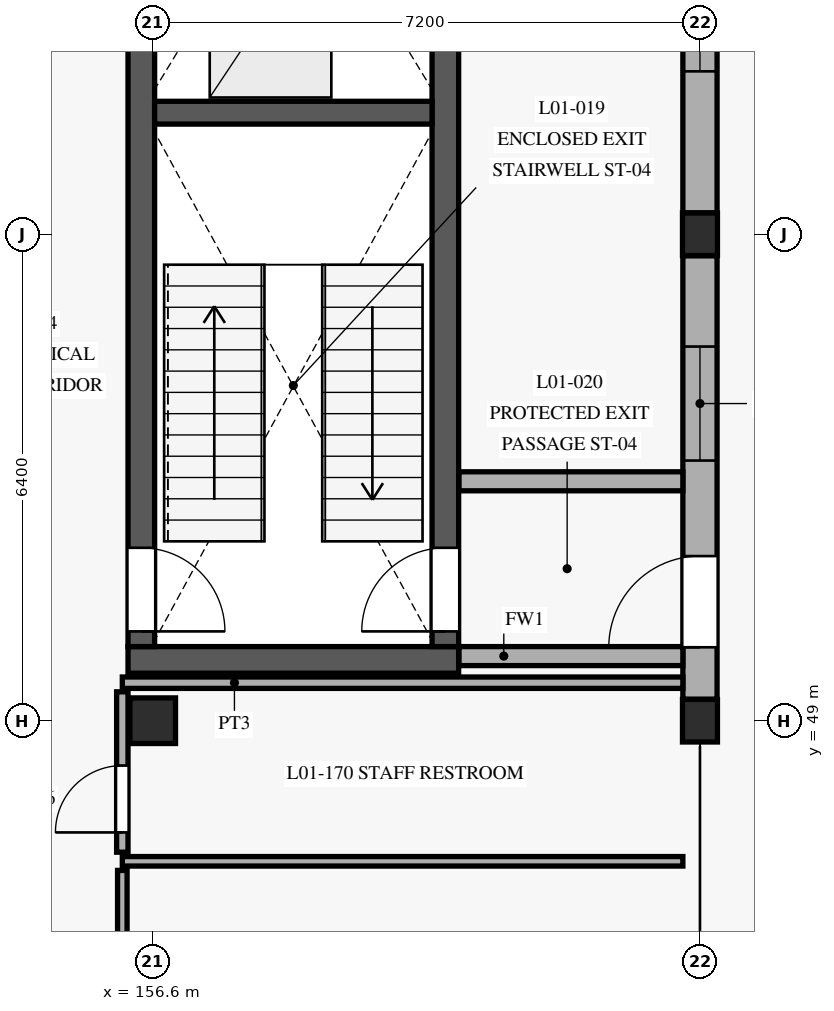
"""IFC4 building model, lengths in metres.
Left out: names, types, materials, properties, quantities, classifications, styles, units other than length and angle.
Written with IfcOpenShell. Run it as: python <this file> out.ifc"""

import sys

from ifc_helpers import new_model, si_unit, direction, frame, frame_2d, origin, origin_with_axes, origin_2d, place, context, subcontext, project, spatial, rectangle, extrude, element, fill, save


model = new_model("IFC4")
c1 = context("Model", 3, precision=1e-05, world=origin(), true_north=direction((0.0, 1.0)))
c2 = subcontext(c1, "Body", "Model", "MODEL_VIEW")
j1 = project(units=[si_unit("LENGTHUNIT", "METRE"), si_unit("PLANEANGLEUNIT", "RADIAN")], contexts=[c1])
p1 = place(None, origin())
s1 = spatial("IfcSite", under=j1, at=p1, CompositionType="ELEMENT")
p2 = place(p1, origin())
s2 = spatial("IfcBuilding", under=s1, at=p2, CompositionType="ELEMENT")
p3 = place(p2, origin())
s3 = spatial("IfcBuildingStorey", under=s2, at=p3, CompositionType="ELEMENT", Elevation=0.0)
p4 = place(p3, frame((156.6, 49.0, 0.0), z_axis=(0.0, 0.0, 1.0), x_axis=(1.0, 0.0, 0.0)))
e1 = element("IfcColumn", 1, at=p4, inside=s3, PredefinedType="COLUMN", context=c2, shape_type="SweptSolid", body=[
    extrude(rectangle(XDim=0.6, YDim=0.6, at=origin_2d()), origin(), (0.0, 0.0, 1.0), 4.8),
])
for number, where, z_axis, x_axis in (
    (2, (163.8, 49.0, 0.0), (0.0, 0.0, 1.0), (1.0, 0.0, 0.0)),
    (3, (163.8, 55.4, 0.0), (0.0, 0.0, 1.0), (1.0, 0.0, 0.0)),
):
    element("IfcColumn", number, at=place(p3, frame(where, z_axis=z_axis, x_axis=x_axis)), inside=s3, PredefinedType="COLUMN", context=c2, shape_type="SweptSolid", body=[
        extrude(rectangle(XDim=0.46, YDim=0.56, at=origin_2d()), origin(), (0.0, 0.0, 1.0), 4.8),
    ])
p5 = place(p3, frame((156.275, 49.8, 0.0), z_axis=(0.0, 0.0, 1.0), x_axis=(1.0, 0.0, 0.0)))
e4 = element("IfcWall", 4, at=p5, inside=s3, PredefinedType="SHEAR", context=c2, shape_type="SweptSolid", body=[
    extrude(rectangle(XDim=4.35, YDim=0.35, at=frame_2d((2.175, 0.0))), origin(), (0.0, 0.0, 1.0), 4.5),
])
p6 = place(p3, frame((156.45, 63.425, 0.0), z_axis=(0.0, 0.0, 1.0), x_axis=(0.0, -1.0, 0.0)))
e5 = element("IfcWall", 5, at=p6, inside=s3, PredefinedType="SHEAR", context=c2, shape_type="SweptSolid", body=[
    extrude(rectangle(XDim=13.45, YDim=0.35, at=frame_2d((6.725, 0.0))), origin(), (0.0, 0.0, 1.0), 4.5),
])
p7 = place(p6, frame((12.15, 0.0, 0.0)))
e6 = element("IfcOpeningElement", 6, at=p7, cuts=e5, PredefinedType="OPENING", context=c2, shape_type="SweptSolid", body=[
    extrude(rectangle(XDim=1.1, YDim=2.2, at=frame_2d((0.55, 1.1))), frame((0.0, 0.185, 0.0), z_axis=(0.0, -1.0, 0.0), x_axis=(1.0, 0.0, 0.0)), (0.0, 0.0, 1.0), 0.37),
])
p8 = place(p6, frame((4.45, 0.0, 0.0)))
e7 = element("IfcOpeningElement", 7, at=p8, cuts=e5, PredefinedType="OPENING", context=c2, shape_type="SweptSolid", body=[
    extrude(rectangle(XDim=1.15, YDim=2.2, at=frame_2d((0.575, 1.1))), frame((0.0, 0.185, 0.0), z_axis=(0.0, -1.0, 0.0), x_axis=(1.0, 0.0, 0.0)), (0.0, 0.0, 1.0), 0.37),
])
p9 = place(p6, frame((2.315, 0.0, 0.0)))
e8 = element("IfcOpeningElement", 8, at=p9, cuts=e5, PredefinedType="OPENING", context=c2, shape_type="SweptSolid", body=[
    extrude(rectangle(XDim=1.02, YDim=2.15, at=frame_2d((0.51, 1.075))), frame((0.0, 0.185, 0.0), z_axis=(0.0, -1.0, 0.0), x_axis=(1.0, 0.0, 0.0)), (0.0, 0.0, 1.0), 0.37),
])
p10 = place(p6, frame((0.415, 0.0, 0.0)))
e9 = element("IfcOpeningElement", 9, at=p10, cuts=e5, PredefinedType="OPENING", context=c2, shape_type="SweptSolid", body=[
    extrude(rectangle(XDim=1.02, YDim=2.15, at=frame_2d((0.51, 1.075))), frame((0.0, 0.185, 0.0), z_axis=(0.0, -1.0, 0.0), x_axis=(1.0, 0.0, 0.0)), (0.0, 0.0, 1.0), 0.37),
])
p11 = place(p3, frame((160.45, 49.975, 0.0), z_axis=(0.0, 0.0, 1.0), x_axis=(0.0, 1.0, 0.0)))
e10 = element("IfcWall", 10, at=p11, inside=s3, PredefinedType="SHEAR", context=c2, shape_type="SweptSolid", body=[
    extrude(rectangle(XDim=13.45, YDim=0.35, at=frame_2d((6.725, 0.0))), origin(), (0.0, 0.0, 1.0), 4.5),
])
p12 = place(p11, frame((0.2, 0.0, 0.0)))
e11 = element("IfcOpeningElement", 11, at=p12, cuts=e10, PredefinedType="OPENING", context=c2, shape_type="SweptSolid", body=[
    extrude(rectangle(XDim=1.1, YDim=2.2, at=frame_2d((0.55, 1.1))), frame((0.0, 0.185, 0.0), z_axis=(0.0, -1.0, 0.0), x_axis=(1.0, 0.0, 0.0)), (0.0, 0.0, 1.0), 0.37),
])
p13 = place(p3, frame((156.625, 57.0, 0.0), z_axis=(0.0, 0.0, 1.0), x_axis=(1.0, 0.0, 0.0)))
e12 = element("IfcWall", 12, at=p13, inside=s3, PredefinedType="SHEAR", context=c2, shape_type="SweptSolid", body=[
    extrude(rectangle(XDim=3.65, YDim=0.3, at=frame_2d((1.825, 0.0))), origin(), (0.0, 0.0, 1.0), 4.5),
])
p14 = place(p3, frame((163.8, 49.282, 0.0), z_axis=(0.0, 0.0, 1.0), x_axis=(0.0, 1.0, 0.0)))
e13 = element("IfcWall", 13, at=p14, inside=s3, PredefinedType="SOLIDWALL", context=c2, shape_type="SweptSolid", body=[
    extrude(rectangle(XDim=5.836, YDim=0.45, at=frame_2d((2.918, 0.0))), origin(), (0.0, 0.0, 1.0), 3.95),
])
p15 = place(p14, frame((0.684, 0.0, 0.0)))
e14 = element("IfcOpeningElement", 14, at=p15, cuts=e13, PredefinedType="OPENING", context=c2, shape_type="SweptSolid", body=[
    extrude(rectangle(XDim=1.2, YDim=2.25, at=frame_2d((0.6, 1.125))), frame((0.0, 0.235, 0.0), z_axis=(0.0, -1.0, 0.0), x_axis=(1.0, 0.0, 0.0)), (0.0, 0.0, 1.0), 0.47),
])
p16 = place(p14, frame((3.141, 0.0, 0.65)))
e15 = element("IfcOpeningElement", 15, at=p16, cuts=e13, PredefinedType="OPENING", context=c2, shape_type="SweptSolid", body=[
    extrude(rectangle(XDim=1.5, YDim=2.2, at=frame_2d((0.75, 1.1))), frame((0.0, 0.235, 0.0), z_axis=(0.0, -1.0, 0.0), x_axis=(1.0, 0.0, 0.0)), (0.0, 0.0, 1.0), 0.47),
])
p17 = place(p3, frame((163.8, 55.682, 0.0), z_axis=(0.0, 0.0, 1.0), x_axis=(0.0, 1.0, 0.0)))
e16 = element("IfcWall", 16, at=p17, inside=s3, PredefinedType="SOLIDWALL", context=c2, shape_type="SweptSolid", body=[
    extrude(rectangle(XDim=7.836, YDim=0.45, at=frame_2d((3.918, 0.0))), origin(), (0.0, 0.0, 1.0), 3.95),
])
p18 = place(p17, frame((1.862, 0.0, 0.65)))
e17 = element("IfcOpeningElement", 17, at=p18, cuts=e16, PredefinedType="OPENING", context=c2, shape_type="SweptSolid", body=[
    extrude(rectangle(XDim=1.5, YDim=2.2, at=frame_2d((0.75, 1.1))), frame((0.0, 0.235, 0.0), z_axis=(0.0, -1.0, 0.0), x_axis=(1.0, 0.0, 0.0)), (0.0, 0.0, 1.0), 0.47),
])
p19 = place(p17, frame((4.474, 0.0, 0.65)))
e18 = element("IfcOpeningElement", 18, at=p19, cuts=e16, PredefinedType="OPENING", context=c2, shape_type="SweptSolid", body=[
    extrude(rectangle(XDim=1.5, YDim=2.2, at=frame_2d((0.75, 1.1))), frame((0.0, 0.235, 0.0), z_axis=(0.0, -1.0, 0.0), x_axis=(1.0, 0.0, 0.0)), (0.0, 0.0, 1.0), 0.47),
])
for number, where, z_axis, x_axis in (
    (19, (160.63, 49.85, 0.0), (0.0, 0.0, 1.0), (1.0, 0.0, 0.0)),
    (20, (160.63, 52.15, 0.0), (0.0, 0.0, 1.0), (1.0, 0.0, 0.0)),
):
    element("IfcWall", number, at=place(p3, frame(where, z_axis=z_axis, x_axis=x_axis)), inside=s3, PredefinedType="SOLIDWALL", context=c2, shape_type="SweptSolid", body=[
        extrude(rectangle(XDim=2.945, YDim=0.25, at=frame_2d((1.473, 0.0))), origin(), (0.0, 0.0, 1.0), 3.945),
    ])
p20 = place(p3, frame((156.2, 38.0, 0.0), z_axis=(0.0, 0.0, 1.0), x_axis=(0.0, 1.0, 0.0)))
e21 = element("IfcWall", 21, at=p20, inside=s3, PredefinedType="PARTITIONING", context=c2, shape_type="SweptSolid", body=[
    extrude(rectangle(XDim=9.03, YDim=0.125, at=frame_2d((4.515, 0.0))), origin(), (0.0, 0.0, 1.0), 4.495),
])
p21 = place(p20, frame((2.847, 0.0, 0.0)))
e22 = element("IfcOpeningElement", 22, at=p21, cuts=e21, PredefinedType="OPENING", context=c2, shape_type="SweptSolid", body=[
    extrude(rectangle(XDim=0.9, YDim=2.12, at=frame_2d((0.45, 1.06))), frame((0.0, 0.073, 0.0), z_axis=(0.0, -1.0, 0.0), x_axis=(1.0, 0.0, 0.0)), (0.0, 0.0, 1.0), 0.145),
])
p22 = place(p3, frame((156.2, 47.15, 0.0), z_axis=(0.0, 0.0, 1.0), x_axis=(1.0, 0.0, 0.0)))
e23 = element("IfcWall", 23, at=p22, inside=s3, PredefinedType="PARTITIONING", context=c2, shape_type="SweptSolid", body=[
    extrude(rectangle(XDim=7.375, YDim=0.125, at=frame_2d((3.688, 0.0))), origin(), (0.0, 0.0, 1.0), 3.945),
])
p23 = place(p3, frame((156.2, 47.27, 0.0), z_axis=(0.0, 0.0, 1.0), x_axis=(0.0, 1.0, 0.0)))
e24 = element("IfcWall", 24, at=p23, inside=s3, PredefinedType="PARTITIONING", context=c2, shape_type="SweptSolid", body=[
    extrude(rectangle(XDim=2.11, YDim=0.15, at=frame_2d((1.055, 0.0))), origin(), (0.0, 0.0, 1.0), 3.845),
])
p24 = place(p23, frame((0.26, 0.0, 0.0)))
e25 = element("IfcOpeningElement", 25, at=p24, cuts=e24, PredefinedType="OPENING", context=c2, shape_type="SweptSolid", body=[
    extrude(rectangle(XDim=0.88, YDim=2.1, at=frame_2d((0.44, 1.05))), frame((0.0, 0.085, 0.0), z_axis=(0.0, -1.0, 0.0), x_axis=(1.0, 0.0, 0.0)), (0.0, 0.0, 1.0), 0.17),
])
p25 = place(p3, frame((156.2, 49.5, 0.0), z_axis=(0.0, 0.0, 1.0), x_axis=(1.0, 0.0, 0.0)))
e26 = element("IfcWall", 26, at=p25, inside=s3, PredefinedType="PARTITIONING", context=c2, shape_type="SweptSolid", body=[
    extrude(rectangle(XDim=7.375, YDim=0.15, at=frame_2d((3.688, 0.0))), origin(), (0.0, 0.0, 1.0), 3.945),
])
p26 = place(p7, origin_with_axes())
e27 = element("IfcDoor", 27, at=p26, inside=s3, OperationType="SINGLE_SWING_RIGHT", PredefinedType="DOOR", context=c2, shape_type="SweptSolid", body=[
    extrude(rectangle(XDim=1.1, YDim=2.2, at=frame_2d((0.55, 1.1))), frame((0.0, 0.025, 0.0), z_axis=(0.0, -1.0, 0.0), x_axis=(1.0, 0.0, 0.0)), (0.0, 0.0, 1.0), 0.05),
])
fill(e6, e27)
p27 = place(p12, frame((1.1, 0.0, 0.0), z_axis=(0.0, 0.0, 1.0), x_axis=(-1.0, 0.0, 0.0)))
e28 = element("IfcDoor", 28, at=p27, inside=s3, OperationType="SINGLE_SWING_RIGHT", PredefinedType="DOOR", context=c2, shape_type="SweptSolid", body=[
    extrude(rectangle(XDim=1.1, YDim=2.2, at=frame_2d((0.55, 1.1))), frame((0.0, 0.025, 0.0), z_axis=(0.0, -1.0, 0.0), x_axis=(1.0, 0.0, 0.0)), (0.0, 0.0, 1.0), 0.05),
])
fill(e11, e28)
p28 = place(p15, frame((1.2, 0.0, 0.0), z_axis=(0.0, 0.0, 1.0), x_axis=(-1.0, 0.0, 0.0)))
e29 = element("IfcDoor", 29, at=p28, inside=s3, OperationType="SINGLE_SWING_RIGHT", PredefinedType="DOOR", context=c2, shape_type="SweptSolid", body=[
    extrude(rectangle(XDim=1.2, YDim=2.25, at=frame_2d((0.6, 1.125))), frame((0.0, 0.025, 0.0), z_axis=(0.0, -1.0, 0.0), x_axis=(1.0, 0.0, 0.0)), (0.0, 0.0, 1.0), 0.05),
])
fill(e14, e29)
p29 = place(p16, origin_with_axes())
e30 = element("IfcWindow", 30, at=p29, inside=s3, PartitioningType="SINGLE_PANEL", PredefinedType="WINDOW", context=c2, shape_type="SweptSolid", body=[
    extrude(rectangle(XDim=1.5, YDim=2.2, at=frame_2d((0.75, 1.1))), frame((0.0, 0.03, 0.0), z_axis=(0.0, -1.0, 0.0), x_axis=(1.0, 0.0, 0.0)), (0.0, 0.0, 1.0), 0.06),
])
fill(e15, e30)
p30 = place(p18, origin_with_axes())
e31 = element("IfcWindow", 31, at=p30, inside=s3, PartitioningType="SINGLE_PANEL", PredefinedType="WINDOW", context=c2, shape_type="SweptSolid", body=[
    extrude(rectangle(XDim=1.5, YDim=2.2, at=frame_2d((0.75, 1.1))), frame((0.0, 0.03, 0.0), z_axis=(0.0, -1.0, 0.0), x_axis=(1.0, 0.0, 0.0)), (0.0, 0.0, 1.0), 0.06),
])
fill(e17, e31)
p31 = place(p24, frame((0.88, 0.0, 0.0), z_axis=(0.0, 0.0, 1.0), x_axis=(-1.0, 0.0, 0.0)))
e32 = element("IfcDoor", 32, at=p31, inside=s3, OperationType="SINGLE_SWING_RIGHT", PredefinedType="DOOR", context=c2, shape_type="SweptSolid", body=[
    extrude(rectangle(XDim=0.88, YDim=2.1, at=frame_2d((0.44, 1.05))), frame((0.0, 0.025, 0.0), z_axis=(0.0, -1.0, 0.0), x_axis=(1.0, 0.0, 0.0)), (0.0, 0.0, 1.0), 0.05),
])
fill(e25, e32)
save(model, sys.argv[1])
